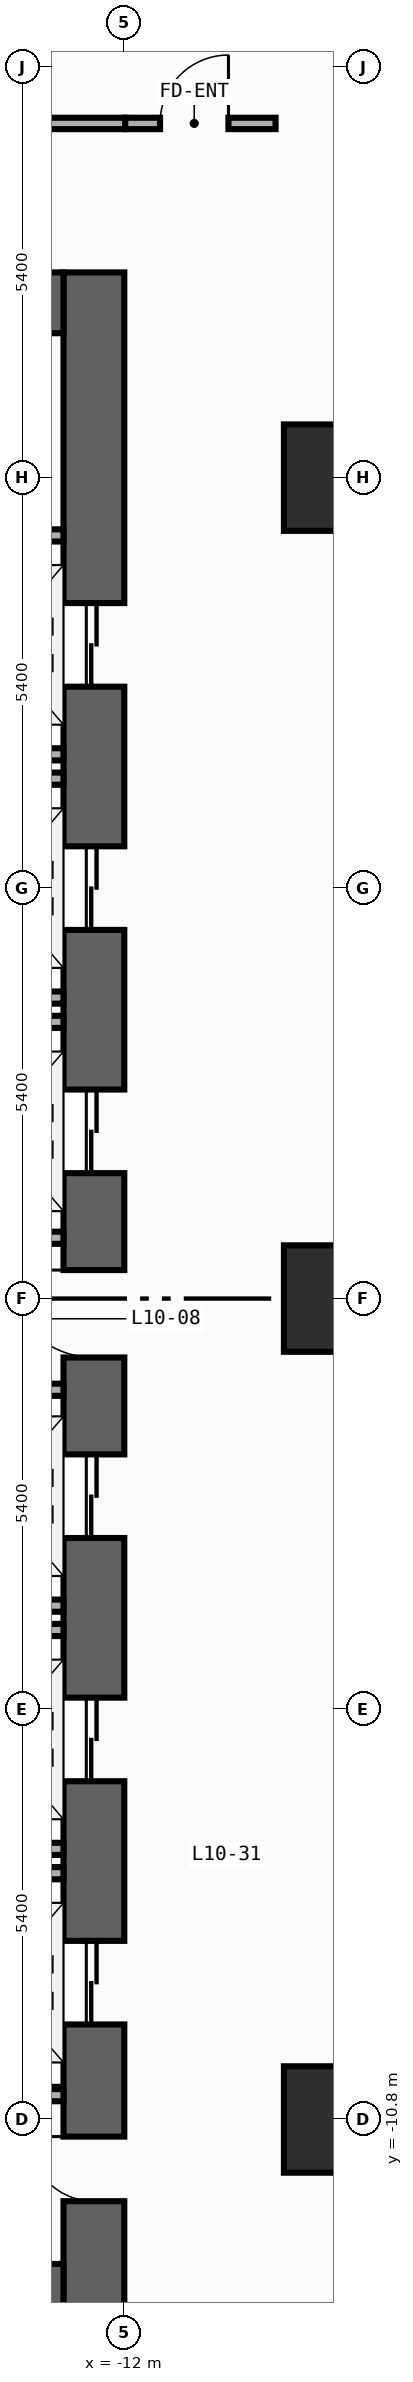
"""IFC4 building model, lengths in metres.
Left out: names, types, materials, properties, quantities, classifications, styles, units other than length and angle.
Written with IfcOpenShell. Run it as: python <this file> out.ifc"""

import sys

from ifc_helpers import new_model, si_unit, direction, frame, frame_2d, origin, origin_2d, place, context, subcontext, project, spatial, rectangle, extrude, element, fill, save


model = new_model("IFC4")
c1 = context("Model", 3, precision=1e-05, world=origin(), true_north=direction((0.0, 1.0)))
c2 = subcontext(c1, "Body", "Model", "MODEL_VIEW")
j1 = project(units=[si_unit("LENGTHUNIT", "METRE"), si_unit("PLANEANGLEUNIT", "RADIAN")], contexts=[c1])
p1 = place(None, origin())
s1 = spatial("IfcSite", under=j1, at=p1, CompositionType="ELEMENT")
p2 = place(p1, origin())
s2 = spatial("IfcBuilding", under=s1, at=p2, CompositionType="ELEMENT")
p3 = place(p2, frame((0.0, 0.0, 42.8)))
s3 = spatial("IfcBuildingStorey", under=s2, at=p3, CompositionType="ELEMENT", Elevation=42.8)
p4 = place(p3, frame((-12.4, -13.5, 0.0), z_axis=(0.0, 0.0, 1.0), x_axis=(0.0, 1.0, 0.0)))
e1 = element("IfcWall", 1, at=p4, inside=s3, PredefinedType="SHEAR", context=c2, shape_type="SweptSolid", body=[
    extrude(rectangle(XDim=27.0, YDim=0.8, at=frame_2d((13.5, 0.0))), origin(), (0.0, 0.0, 1.0), 3.94),
])
p5 = place(p4, frame((21.55, 0.0, 0.0)))
e2 = element("IfcOpeningElement", 2, at=p5, cuts=e1, PredefinedType="OPENING", context=c2, shape_type="SweptSolid", body=[
    extrude(rectangle(XDim=1.1, YDim=2.2, at=frame_2d((0.55, 1.1))), frame((0.0, 0.41, 0.0), z_axis=(0.0, -1.0, 0.0), x_axis=(1.0, 0.0, 0.0)), (0.0, 0.0, 1.0), 0.82),
])
p6 = place(p4, frame((18.35, 0.0, 0.0)))
e3 = element("IfcOpeningElement", 3, at=p6, cuts=e1, PredefinedType="OPENING", context=c2, shape_type="SweptSolid", body=[
    extrude(rectangle(XDim=1.1, YDim=2.2, at=frame_2d((0.55, 1.1))), frame((0.0, 0.41, 0.0), z_axis=(0.0, -1.0, 0.0), x_axis=(1.0, 0.0, 0.0)), (0.0, 0.0, 1.0), 0.82),
])
p7 = place(p4, frame((15.15, 0.0, 0.0)))
e4 = element("IfcOpeningElement", 4, at=p7, cuts=e1, PredefinedType="OPENING", context=c2, shape_type="SweptSolid", body=[
    extrude(rectangle(XDim=1.1, YDim=2.2, at=frame_2d((0.55, 1.1))), frame((0.0, 0.41, 0.0), z_axis=(0.0, -1.0, 0.0), x_axis=(1.0, 0.0, 0.0)), (0.0, 0.0, 1.0), 0.82),
])
p8 = place(p4, frame((10.35, 0.0, 0.0)))
e5 = element("IfcOpeningElement", 5, at=p8, cuts=e1, PredefinedType="OPENING", context=c2, shape_type="SweptSolid", body=[
    extrude(rectangle(XDim=1.1, YDim=2.2, at=frame_2d((0.55, 1.1))), frame((0.0, 0.41, 0.0), z_axis=(0.0, -1.0, 0.0), x_axis=(1.0, 0.0, 0.0)), (0.0, 0.0, 1.0), 0.82),
])
p9 = place(p4, frame((7.15, 0.0, 0.0)))
e6 = element("IfcOpeningElement", 6, at=p9, cuts=e1, PredefinedType="OPENING", context=c2, shape_type="SweptSolid", body=[
    extrude(rectangle(XDim=1.1, YDim=2.2, at=frame_2d((0.55, 1.1))), frame((0.0, 0.41, 0.0), z_axis=(0.0, -1.0, 0.0), x_axis=(1.0, 0.0, 0.0)), (0.0, 0.0, 1.0), 0.82),
])
p10 = place(p4, frame((3.95, 0.0, 0.0)))
e7 = element("IfcOpeningElement", 7, at=p10, cuts=e1, PredefinedType="OPENING", context=c2, shape_type="SweptSolid", body=[
    extrude(rectangle(XDim=1.1, YDim=2.2, at=frame_2d((0.55, 1.1))), frame((0.0, 0.41, 0.0), z_axis=(0.0, -1.0, 0.0), x_axis=(1.0, 0.0, 0.0)), (0.0, 0.0, 1.0), 0.82),
])
p11 = place(p4, frame((12.725, 0.0, 0.0)))
e8 = element("IfcOpeningElement", 8, at=p11, cuts=e1, PredefinedType="OPENING", context=c2, shape_type="SweptSolid", body=[
    extrude(rectangle(XDim=1.15, YDim=2.2, at=frame_2d((0.575, 1.1))), frame((0.0, 0.41, 0.0), z_axis=(0.0, -1.0, 0.0), x_axis=(1.0, 0.0, 0.0)), (0.0, 0.0, 1.0), 0.82),
])
p12 = place(p4, frame((1.625, 0.0, 0.0)))
e9 = element("IfcOpeningElement", 9, at=p12, cuts=e1, PredefinedType="OPENING", context=c2, shape_type="SweptSolid", body=[
    extrude(rectangle(XDim=0.85, YDim=2.1, at=frame_2d((0.425, 1.05))), frame((0.0, 0.41, 0.0), z_axis=(0.0, -1.0, 0.0), x_axis=(1.0, 0.0, 0.0)), (0.0, 0.0, 1.0), 0.82),
])
for number, where, z_axis, x_axis in (
    (10, (-19.6, -13.1, 0.0), (0.0, 0.0, 1.0), (1.0, 0.0, 0.0)),
    (11, (-19.6, 13.1, 0.0), (0.0, 0.0, 1.0), (1.0, 0.0, 0.0)),
):
    element("IfcWall", number, at=place(p3, frame(where, z_axis=z_axis, x_axis=x_axis)), inside=s3, PredefinedType="SHEAR", context=c2, shape_type="SweptSolid", body=[
        extrude(rectangle(XDim=6.8, YDim=0.8, at=frame_2d((3.4, 0.0))), origin(), (0.0, 0.0, 1.0), 3.94),
    ])
for number, where, z_axis, x_axis in (
    (12, (-9.2, -10.8, 0.0), (0.0, 0.0, 1.0), (1.0, 0.0, 0.0)),
    (13, (-9.2, 0.0, 0.0), (0.0, 0.0, 1.0), (1.0, 0.0, 0.0)),
    (14, (-9.2, 10.8, 0.0), (0.0, 0.0, 1.0), (1.0, 0.0, 0.0)),
):
    element("IfcColumn", number, at=place(p3, frame(where, z_axis=z_axis, x_axis=x_axis)), inside=s3, PredefinedType="COLUMN", context=c2, shape_type="SweptSolid", body=[
        extrude(rectangle(XDim=1.4, YDim=1.4, at=origin_2d()), origin(), (0.0, 0.0, 1.0), 4.2),
    ])
for number, where, z_axis, x_axis in (
    (15, (-14.99, 7.16, 0.0), (0.0, 0.0, 1.0), (1.0, 0.0, 0.0)),
    (16, (-14.99, 10.04, 0.0), (0.0, 0.0, 1.0), (1.0, 0.0, 0.0)),
    (17, (-14.99, 3.96, 0.0), (0.0, 0.0, 1.0), (1.0, 0.0, 0.0)),
    (18, (-14.99, 6.84, 0.0), (0.0, 0.0, 1.0), (1.0, 0.0, 0.0)),
    (19, (-14.99, 3.64, 0.0), (0.0, 0.0, 1.0), (1.0, 0.0, 0.0)),
    (20, (-14.99, -4.04, 0.0), (0.0, 0.0, 1.0), (1.0, 0.0, 0.0)),
    (21, (-14.99, -7.24, 0.0), (0.0, 0.0, 1.0), (1.0, 0.0, 0.0)),
    (22, (-14.99, -4.36, 0.0), (0.0, 0.0, 1.0), (1.0, 0.0, 0.0)),
    (23, (-14.99, -7.56, 0.0), (0.0, 0.0, 1.0), (1.0, 0.0, 0.0)),
):
    element("IfcWall", number, at=place(p3, frame(where, z_axis=z_axis, x_axis=x_axis)), inside=s3, PredefinedType="STANDARD", context=c2, shape_type="SweptSolid", body=[
        extrude(rectangle(XDim=2.19, YDim=0.16, at=frame_2d((1.095, 0.0))), origin(), (0.0, 0.0, 1.0), 3.94),
    ])
for number, where, z_axis, x_axis in (
    (24, (-15.4, 0.8, 0.0), (0.0, 0.0, 1.0), (1.0, 0.0, 0.0)),
    (25, (-15.4, -1.2, 0.0), (0.0, 0.0, 1.0), (1.0, 0.0, 0.0)),
    (26, (-15.4, -10.48, 0.0), (0.0, 0.0, 1.0), (1.0, 0.0, 0.0)),
):
    element("IfcWall", number, at=place(p3, frame(where, z_axis=z_axis, x_axis=x_axis)), inside=s3, PredefinedType="STANDARD", context=c2, shape_type="SweptSolid", body=[
        extrude(rectangle(XDim=2.6, YDim=0.16, at=frame_2d((1.3, 0.0))), origin(), (0.0, 0.0, 1.0), 3.94),
    ])
p13 = place(p3, frame((-11.99, 15.46, 0.0), z_axis=(0.0, 0.0, 1.0), x_axis=(1.0, 0.0, 0.0)))
e27 = element("IfcWall", 27, at=p13, inside=s3, PredefinedType="PARTITIONING", context=c2, shape_type="SweptSolid", body=[
    extrude(rectangle(XDim=1.98, YDim=0.15, at=frame_2d((0.99, 0.0))), origin(), (0.0, 0.0, 1.0), 3.94),
])
p14 = place(p13, frame((0.46, 0.0, 0.0)))
e28 = element("IfcOpeningElement", 28, at=p14, cuts=e27, PredefinedType="OPENING", context=c2, shape_type="SweptSolid", body=[
    extrude(rectangle(XDim=0.9, YDim=2.15, at=frame_2d((0.45, 1.075))), frame((0.0, 0.085, 0.0), z_axis=(0.0, -1.0, 0.0), x_axis=(1.0, 0.0, 0.0)), (0.0, 0.0, 1.0), 0.17),
])
p15 = place(p3, frame((-20.64, 15.46, 0.0), z_axis=(0.0, 0.0, 1.0), x_axis=(1.0, 0.0, 0.0)))
e29 = element("IfcWall", 29, at=p15, inside=s3, PredefinedType="PARTITIONING", context=c2, shape_type="SweptSolid", body=[
    extrude(rectangle(XDim=8.65, YDim=0.15, at=frame_2d((4.325, 0.0))), origin(), (0.0, 0.0, 1.0), 3.94),
])
p16 = place(p15, frame((2.871, 0.0, 0.0)))
e30 = element("IfcOpeningElement", 30, at=p16, cuts=e29, PredefinedType="OPENING", context=c2, shape_type="SweptSolid", body=[
    extrude(rectangle(XDim=0.9, YDim=2.15, at=frame_2d((0.45, 1.075))), frame((0.0, 0.085, 0.0), z_axis=(0.0, -1.0, 0.0), x_axis=(1.0, 0.0, 0.0)), (0.0, 0.0, 1.0), 0.17),
])
p17 = place(p5, origin())
e31 = element("IfcDoor", 31, at=p17, inside=s3, OperationType="DOUBLE_DOOR_SLIDING", PredefinedType="DOOR", context=c2, shape_type="SweptSolid", body=[
    extrude(rectangle(XDim=1.1, YDim=2.2, at=frame_2d((0.55, 1.1))), frame((0.0, 0.025, 0.0), z_axis=(0.0, -1.0, 0.0), x_axis=(1.0, 0.0, 0.0)), (0.0, 0.0, 1.0), 0.05),
])
fill(e2, e31)
p18 = place(p6, origin())
e32 = element("IfcDoor", 32, at=p18, inside=s3, OperationType="DOUBLE_DOOR_SLIDING", PredefinedType="DOOR", context=c2, shape_type="SweptSolid", body=[
    extrude(rectangle(XDim=1.1, YDim=2.2, at=frame_2d((0.55, 1.1))), frame((0.0, 0.025, 0.0), z_axis=(0.0, -1.0, 0.0), x_axis=(1.0, 0.0, 0.0)), (0.0, 0.0, 1.0), 0.05),
])
fill(e3, e32)
p19 = place(p7, origin())
e33 = element("IfcDoor", 33, at=p19, inside=s3, OperationType="DOUBLE_DOOR_SLIDING", PredefinedType="DOOR", context=c2, shape_type="SweptSolid", body=[
    extrude(rectangle(XDim=1.1, YDim=2.2, at=frame_2d((0.55, 1.1))), frame((0.0, 0.025, 0.0), z_axis=(0.0, -1.0, 0.0), x_axis=(1.0, 0.0, 0.0)), (0.0, 0.0, 1.0), 0.05),
])
fill(e4, e33)
p20 = place(p8, origin())
e34 = element("IfcDoor", 34, at=p20, inside=s3, OperationType="DOUBLE_DOOR_SLIDING", PredefinedType="DOOR", context=c2, shape_type="SweptSolid", body=[
    extrude(rectangle(XDim=1.1, YDim=2.2, at=frame_2d((0.55, 1.1))), frame((0.0, 0.025, 0.0), z_axis=(0.0, -1.0, 0.0), x_axis=(1.0, 0.0, 0.0)), (0.0, 0.0, 1.0), 0.05),
])
fill(e5, e34)
p21 = place(p9, origin())
e35 = element("IfcDoor", 35, at=p21, inside=s3, OperationType="DOUBLE_DOOR_SLIDING", PredefinedType="DOOR", context=c2, shape_type="SweptSolid", body=[
    extrude(rectangle(XDim=1.1, YDim=2.2, at=frame_2d((0.55, 1.1))), frame((0.0, 0.025, 0.0), z_axis=(0.0, -1.0, 0.0), x_axis=(1.0, 0.0, 0.0)), (0.0, 0.0, 1.0), 0.05),
])
fill(e6, e35)
p22 = place(p10, origin())
e36 = element("IfcDoor", 36, at=p22, inside=s3, OperationType="DOUBLE_DOOR_SLIDING", PredefinedType="DOOR", context=c2, shape_type="SweptSolid", body=[
    extrude(rectangle(XDim=1.1, YDim=2.2, at=frame_2d((0.55, 1.1))), frame((0.0, 0.025, 0.0), z_axis=(0.0, -1.0, 0.0), x_axis=(1.0, 0.0, 0.0)), (0.0, 0.0, 1.0), 0.05),
])
fill(e7, e36)
p23 = place(p11, origin())
e37 = element("IfcDoor", 37, at=p23, inside=s3, OperationType="SINGLE_SWING_RIGHT", PredefinedType="DOOR", context=c2, shape_type="SweptSolid", body=[
    extrude(rectangle(XDim=1.15, YDim=2.2, at=frame_2d((0.575, 1.1))), frame((0.0, 0.025, 0.0), z_axis=(0.0, -1.0, 0.0), x_axis=(1.0, 0.0, 0.0)), (0.0, 0.0, 1.0), 0.05),
])
fill(e8, e37)
p24 = place(p12, origin())
e38 = element("IfcDoor", 38, at=p24, inside=s3, OperationType="SINGLE_SWING_RIGHT", PredefinedType="DOOR", context=c2, shape_type="SweptSolid", body=[
    extrude(rectangle(XDim=0.85, YDim=2.1, at=frame_2d((0.425, 1.05))), frame((0.0, 0.025, 0.0), z_axis=(0.0, -1.0, 0.0), x_axis=(1.0, 0.0, 0.0)), (0.0, 0.0, 1.0), 0.05),
])
fill(e9, e38)
p25 = place(p14, origin())
e39 = element("IfcDoor", 39, at=p25, inside=s3, OperationType="SINGLE_SWING_RIGHT", PredefinedType="DOOR", context=c2, shape_type="SweptSolid", body=[
    extrude(rectangle(XDim=0.9, YDim=2.15, at=frame_2d((0.45, 1.075))), frame((0.0, 0.025, 0.0), z_axis=(0.0, -1.0, 0.0), x_axis=(1.0, 0.0, 0.0)), (0.0, 0.0, 1.0), 0.05),
])
fill(e28, e39)
save(model, sys.argv[1])
